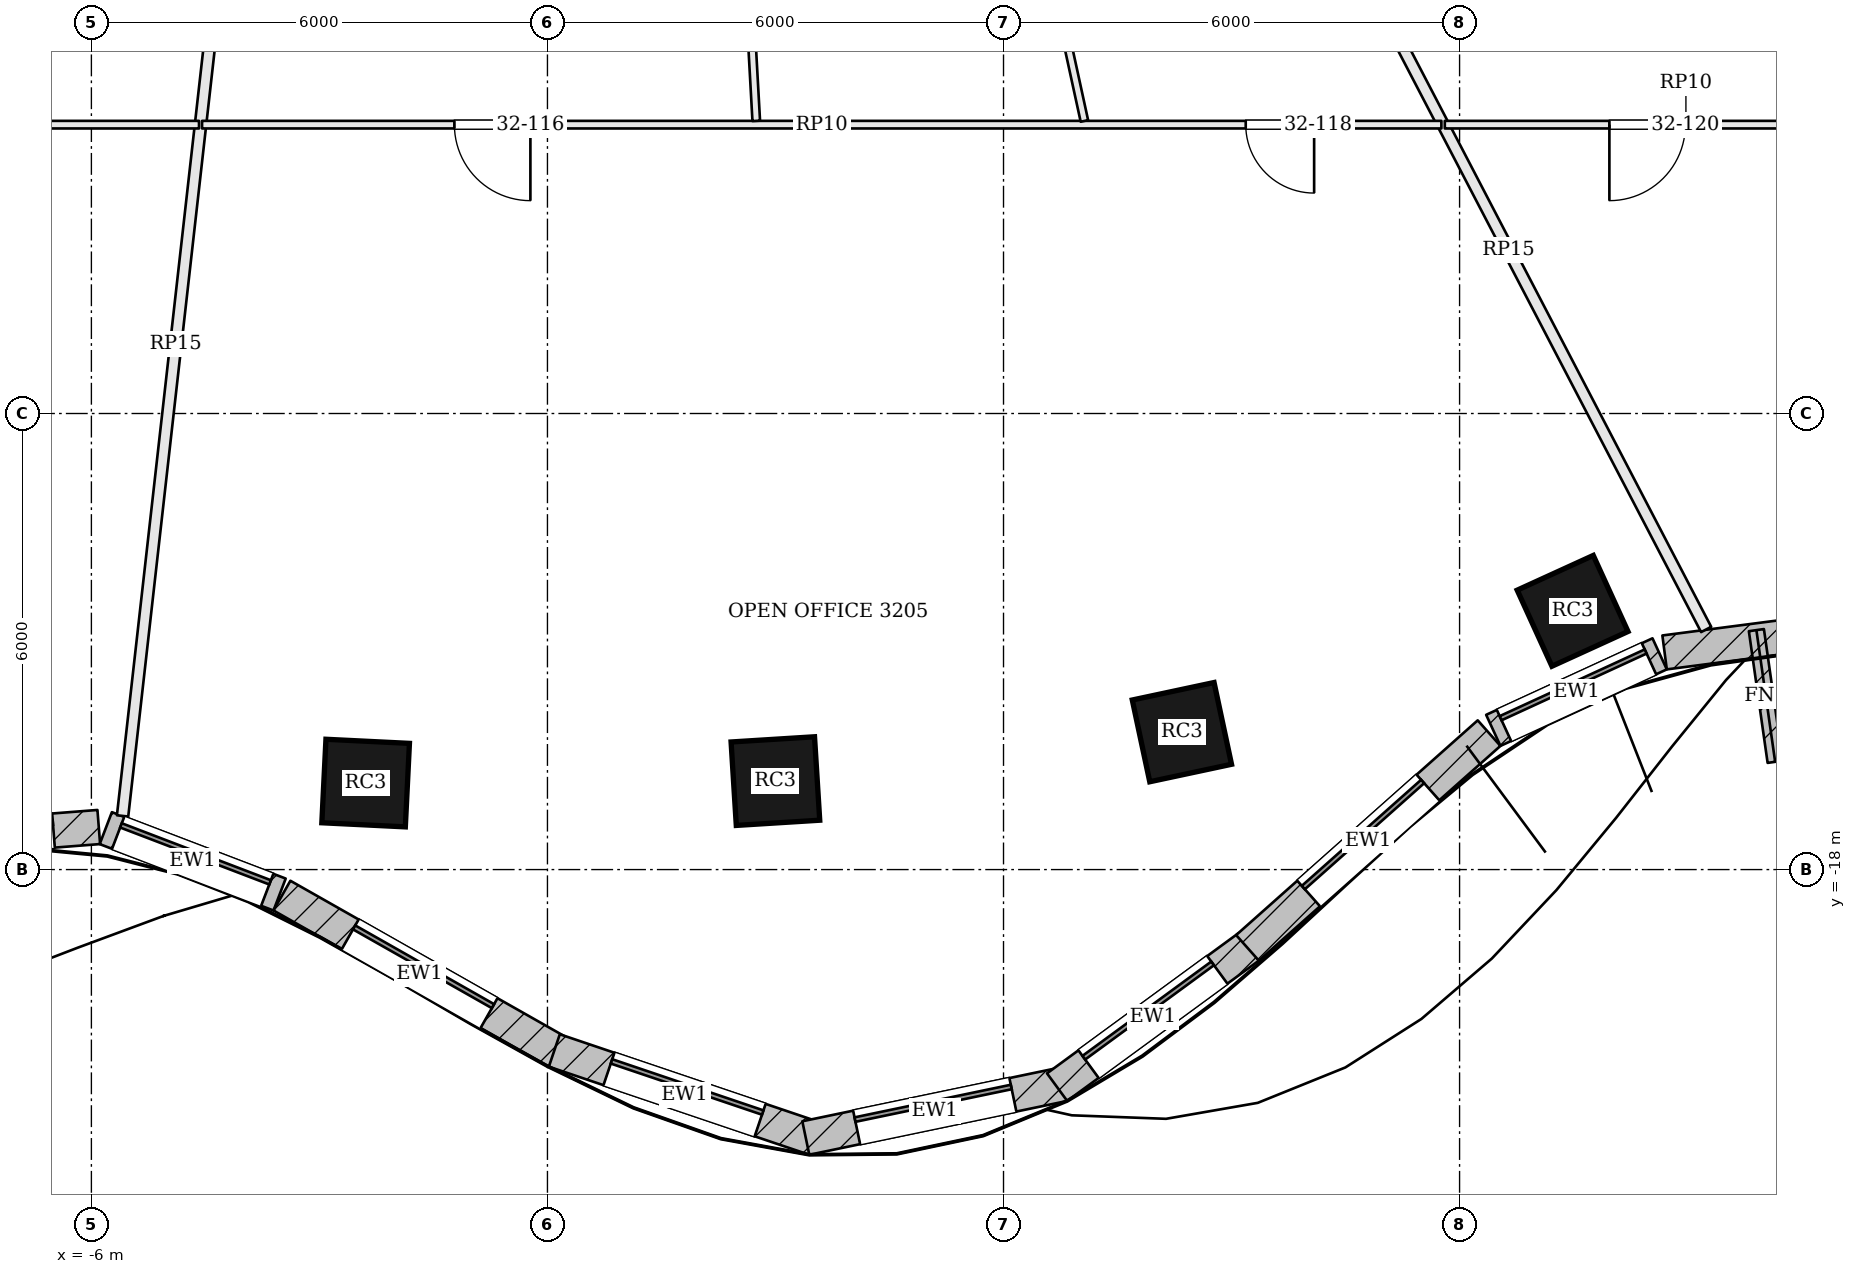
"""IFC4 building model, lengths in metres.
Left out: names, types, materials, properties, quantities, classifications, styles, units other than length and angle.
Written with IfcOpenShell. Run it as: python <this file> out.ifc"""

import sys

from ifc_helpers import new_model, si_unit, direction, frame, frame_2d, origin, origin_2d, place, context, subcontext, project, spatial, rectangle, extrude, element, fill, save


model = new_model("IFC4")
c1 = context("Model", 3, precision=1e-05, world=origin(), true_north=direction((0.0, 1.0)))
c2 = subcontext(c1, "Body", "Model", "MODEL_VIEW")
j1 = project(units=[si_unit("LENGTHUNIT", "METRE"), si_unit("PLANEANGLEUNIT", "RADIAN")], contexts=[c1])
p1 = place(None, origin())
s1 = spatial("IfcSite", under=j1, at=p1, CompositionType="ELEMENT")
p2 = place(p1, origin())
s2 = spatial("IfcBuilding", under=s1, at=p2, CompositionType="ELEMENT")
p3 = place(p2, frame((0.0, 0.0, 134.4)))
s3 = spatial("IfcBuildingStorey", under=s2, at=p3, CompositionType="ELEMENT", Elevation=134.4)
for number, where, z_axis, x_axis in (
    (1, (-2.392, -16.862, 0.0), (0.0, 0.0, 1.0), (0.999, -0.049, 0.0)),
    (2, (2.999, -16.836, 0.0), (0.0, 0.0, 1.0), (0.998, 0.062, 0.0)),
    (3, (8.347, -16.192, 0.0), (0.0, 0.0, 1.0), (0.978, 0.209, 0.0)),
    (4, (13.487, -14.596, 0.0), (0.0, 0.0, 1.0), (0.91, 0.415, 0.0)),
):
    element("IfcColumn", number, at=place(p3, frame(where, z_axis=z_axis, x_axis=x_axis)), inside=s3, PredefinedType="COLUMN", context=c2, shape_type="SweptSolid", body=[
        extrude(rectangle(XDim=1.1, YDim=1.1, at=origin_2d()), origin(), (0.0, 0.0, 1.0), 3.9),
    ])
p4 = place(p3, frame((-9.188, -17.697, 0.0), z_axis=(0.0, 0.0, 1.0), x_axis=(0.996964028691, 0.077863505548, 0.0)))
e5 = element("IfcWall", 5, at=p4, inside=s3, PredefinedType="SOLIDWALL", context=c2, shape_type="SweptSolid", body=[
    extrude(rectangle(XDim=3.295, YDim=0.45, at=frame_2d((1.648, 0.0))), origin(), (0.0, 0.0, 1.0), 3.7),
])
p5 = place(p4, frame((0.598, 0.0, 0.9)))
e6 = element("IfcOpeningElement", 6, at=p5, cuts=e5, PredefinedType="OPENING", context=c2, shape_type="SweptSolid", body=[
    extrude(rectangle(XDim=2.1, YDim=2.3, at=frame_2d((1.05, 1.15))), frame((0.0, 0.235, 0.0), z_axis=(0.0, -1.0, 0.0), x_axis=(1.0, 0.0, 0.0)), (0.0, 0.0, 1.0), 0.47),
])
p6 = place(p3, frame((-5.811, -17.455, 0.0), z_axis=(0.0, 0.0, 1.0), x_axis=(0.934122271306, -0.35695319336, 0.0)))
e7 = element("IfcWall", 7, at=p6, inside=s3, PredefinedType="SOLIDWALL", context=c2, shape_type="SweptSolid", body=[
    extrude(rectangle(XDim=2.448, YDim=0.45, at=frame_2d((1.224, 0.0))), origin(), (0.0, 0.0, 1.0), 3.7),
])
p7 = place(p6, frame((0.174, 0.0, 0.9)))
e8 = element("IfcOpeningElement", 8, at=p7, cuts=e7, PredefinedType="OPENING", context=c2, shape_type="SweptSolid", body=[
    extrude(rectangle(XDim=2.1, YDim=2.3, at=frame_2d((1.05, 1.15))), frame((0.0, 0.235, 0.0), z_axis=(0.0, -1.0, 0.0), x_axis=(1.0, 0.0, 0.0)), (0.0, 0.0, 1.0), 0.47),
])
p8 = place(p3, frame((-3.493, -18.343, 0.0), z_axis=(0.0, 0.0, 1.0), x_axis=(0.869825988853, -0.493358641473, 0.0)))
e9 = element("IfcWall", 9, at=p8, inside=s3, PredefinedType="SOLIDWALL", context=c2, shape_type="SweptSolid", body=[
    extrude(rectangle(XDim=4.165, YDim=0.45, at=frame_2d((2.083, 0.0))), origin(), (0.0, 0.0, 1.0), 3.7),
])
p9 = place(p8, frame((1.032, 0.0, 0.9)))
e10 = element("IfcOpeningElement", 10, at=p9, cuts=e9, PredefinedType="OPENING", context=c2, shape_type="SweptSolid", body=[
    extrude(rectangle(XDim=2.1, YDim=2.3, at=frame_2d((1.05, 1.15))), frame((0.0, 0.235, 0.0), z_axis=(0.0, -1.0, 0.0), x_axis=(1.0, 0.0, 0.0)), (0.0, 0.0, 1.0), 0.47),
])
p10 = place(p3, frame((0.091, -20.38, 0.0), z_axis=(0.0, 0.0, 1.0), x_axis=(0.947304227221, -0.320335294791, 0.0)))
e11 = element("IfcWall", 11, at=p10, inside=s3, PredefinedType="SOLIDWALL", context=c2, shape_type="SweptSolid", body=[
    extrude(rectangle(XDim=3.617, YDim=0.45, at=frame_2d((1.809, 0.0))), origin(), (0.0, 0.0, 1.0), 3.7),
])
p11 = place(p10, frame((0.759, 0.0, 0.9)))
e12 = element("IfcOpeningElement", 12, at=p11, cuts=e11, PredefinedType="OPENING", context=c2, shape_type="SweptSolid", body=[
    extrude(rectangle(XDim=2.1, YDim=2.3, at=frame_2d((1.05, 1.15))), frame((0.0, 0.235, 0.0), z_axis=(0.0, -1.0, 0.0), x_axis=(1.0, 0.0, 0.0)), (0.0, 0.0, 1.0), 0.47),
])
p12 = place(p3, frame((3.399, -21.532, 0.0), z_axis=(0.0, 0.0, 1.0), x_axis=(0.978915912181, 0.204263645512, 0.0)))
e13 = element("IfcWall", 13, at=p12, inside=s3, PredefinedType="SOLIDWALL", context=c2, shape_type="SweptSolid", body=[
    extrude(rectangle(XDim=3.466, YDim=0.45, at=frame_2d((1.733, 0.0))), origin(), (0.0, 0.0, 1.0), 3.7),
])
p13 = place(p12, frame((0.683, 0.0, 0.9)))
e14 = element("IfcOpeningElement", 14, at=p13, cuts=e13, PredefinedType="OPENING", context=c2, shape_type="SweptSolid", body=[
    extrude(rectangle(XDim=2.1, YDim=2.3, at=frame_2d((1.05, 1.15))), frame((0.0, 0.235, 0.0), z_axis=(0.0, -1.0, 0.0), x_axis=(1.0, 0.0, 0.0)), (0.0, 0.0, 1.0), 0.47),
])
p14 = place(p3, frame((6.705, -20.862, 0.0), z_axis=(0.0, 0.0, 1.0), x_axis=(0.806921336267, 0.590658917716, 0.0)))
e15 = element("IfcWall", 15, at=p14, inside=s3, PredefinedType="SOLIDWALL", context=c2, shape_type="SweptSolid", body=[
    extrude(rectangle(XDim=3.125, YDim=0.45, at=frame_2d((1.562, 0.0))), origin(), (0.0, 0.0, 1.0), 3.7),
])
p15 = place(p14, frame((0.512, 0.0, 0.9)))
e16 = element("IfcOpeningElement", 16, at=p15, cuts=e15, PredefinedType="OPENING", context=c2, shape_type="SweptSolid", body=[
    extrude(rectangle(XDim=2.1, YDim=2.3, at=frame_2d((1.05, 1.15))), frame((0.0, 0.235, 0.0), z_axis=(0.0, -1.0, 0.0), x_axis=(1.0, 0.0, 0.0)), (0.0, 0.0, 1.0), 0.47),
])
p16 = place(p3, frame((9.21, -19.03, 0.0), z_axis=(0.0, 0.0, 1.0), x_axis=(0.747396648191, 0.664378092861, 0.0)))
e17 = element("IfcWall", 17, at=p16, inside=s3, PredefinedType="SOLIDWALL", context=c2, shape_type="SweptSolid", body=[
    extrude(rectangle(XDim=4.252, YDim=0.45, at=frame_2d((2.126, 0.0))), origin(), (0.0, 0.0, 1.0), 3.7),
])
p17 = place(p16, frame((1.076, 0.0, 0.9)))
e18 = element("IfcOpeningElement", 18, at=p17, cuts=e17, PredefinedType="OPENING", context=c2, shape_type="SweptSolid", body=[
    extrude(rectangle(XDim=2.1, YDim=2.3, at=frame_2d((1.05, 1.15))), frame((0.0, 0.235, 0.0), z_axis=(0.0, -1.0, 0.0), x_axis=(1.0, 0.0, 0.0)), (0.0, 0.0, 1.0), 0.47),
])
p18 = place(p3, frame((12.444, -16.169, 0.0), z_axis=(0.0, 0.0, 1.0), x_axis=(0.908468904074, 0.417952449844, 0.0)))
e19 = element("IfcWall", 19, at=p18, inside=s3, PredefinedType="SOLIDWALL", context=c2, shape_type="SweptSolid", body=[
    extrude(rectangle(XDim=2.409, YDim=0.45, at=frame_2d((1.205, 0.0))), origin(), (0.0, 0.0, 1.0), 3.7),
])
p19 = place(p18, frame((0.155, 0.0, 0.9)))
e20 = element("IfcOpeningElement", 20, at=p19, cuts=e19, PredefinedType="OPENING", context=c2, shape_type="SweptSolid", body=[
    extrude(rectangle(XDim=2.1, YDim=2.3, at=frame_2d((1.05, 1.15))), frame((0.0, 0.235, 0.0), z_axis=(0.0, -1.0, 0.0), x_axis=(1.0, 0.0, 0.0)), (0.0, 0.0, 1.0), 0.47),
])
p20 = place(p3, frame((14.697, -15.143, 0.0), z_axis=(0.0, 0.0, 1.0), x_axis=(0.991631798411, 0.129098320597, 0.0)))
e21 = element("IfcWall", 21, at=p20, inside=s3, PredefinedType="SOLIDWALL", context=c2, shape_type="SweptSolid", body=[
    extrude(rectangle(XDim=5.547, YDim=0.45, at=frame_2d((2.773, 0.0))), origin(), (0.0, 0.0, 1.0), 3.7),
])
p21 = place(p20, frame((1.723, 0.0, 0.9)))
e22 = element("IfcOpeningElement", 22, at=p21, cuts=e21, PredefinedType="OPENING", context=c2, shape_type="SweptSolid", body=[
    extrude(rectangle(XDim=2.1, YDim=2.3, at=frame_2d((1.05, 1.15))), frame((0.0, 0.235, 0.0), z_axis=(0.0, -1.0, 0.0), x_axis=(1.0, 0.0, 0.0)), (0.0, 0.0, 1.0), 0.47),
])
p22 = place(p3, frame((15.905, -14.85, 0.0), z_axis=(0.0, 0.0, 1.0), x_axis=(0.140913490987, -0.990021912918, 0.0)))
e23 = element("IfcWall", 23, at=p22, inside=s3, PredefinedType="SOLIDWALL", context=c2, shape_type="SweptSolid", body=[
    extrude(rectangle(XDim=1.75, YDim=0.2, at=frame_2d((0.875, 0.0))), origin(), (0.0, 0.0, 1.0), 3.7),
])
p23 = place(p3, frame((-5.59, -17.294, 0.0), z_axis=(0.0, 0.0, 1.0), x_axis=(0.112047950982, 0.993702800983, 0.0)))
e24 = element("IfcWall", 24, at=p23, inside=s3, PredefinedType="PARTITIONING", context=c2, shape_type="SweptSolid", body=[
    extrude(rectangle(XDim=12.498, YDim=0.15, at=frame_2d((6.249, 0.0))), origin(), (0.0, 0.0, 1.0), 3.198),
])
p24 = place(p3, frame((15.244, -14.841, 0.0), z_axis=(0.0, 0.0, 1.0), x_axis=(-0.46213645011, 0.88680883029, 0.0)))
e25 = element("IfcWall", 25, at=p24, inside=s3, PredefinedType="PARTITIONING", context=c2, shape_type="SweptSolid", body=[
    extrude(rectangle(XDim=11.248, YDim=0.15, at=frame_2d((5.624, 0.0))), origin(), (0.0, 0.0, 1.0), 3.198),
])
p25 = place(p3, frame((-4.584, -8.2, 0.0), z_axis=(0.0, 0.0, 1.0), x_axis=(-1.0, 0.0, 0.0)))
e26 = element("IfcWall", 26, at=p25, inside=s3, PredefinedType="PARTITIONING", context=c2, shape_type="SweptSolid", body=[
    extrude(rectangle(XDim=13.566, YDim=0.1, at=frame_2d((6.783, 0.0))), origin(), (0.0, 0.0, 1.0), 3.184),
])
p26 = place(p3, frame((-6.453, -4.873, 0.0), z_axis=(0.0, 0.0, 1.0), x_axis=(-0.21917670953, -0.975685179758, 0.0)))
e27 = element("IfcWall", 27, at=p26, inside=s3, PredefinedType="PARTITIONING", context=c2, shape_type="SweptSolid", body=[
    extrude(rectangle(XDim=3.36, YDim=0.1, at=frame_2d((1.68, 0.0))), origin(), (0.0, 0.0, 1.0), 3.184),
])
p27 = place(p3, frame((11.76, -8.2, 0.0), z_axis=(0.0, 0.0, 1.0), x_axis=(-1.0, 0.0, 0.0)))
e28 = element("IfcWall", 28, at=p27, inside=s3, PredefinedType="PARTITIONING", context=c2, shape_type="SweptSolid", body=[
    extrude(rectangle(XDim=16.305, YDim=0.1, at=frame_2d((8.152, 0.0))), origin(), (0.0, 0.0, 1.0), 3.184),
])
p28 = place(p27, frame((11.985, 0.0, 0.0)))
e29 = element("IfcOpeningElement", 29, at=p28, cuts=e28, PredefinedType="OPENING", context=c2, shape_type="SweptSolid", body=[
    extrude(rectangle(XDim=1.0, YDim=2.1, at=frame_2d((0.5, 1.05))), frame((0.0, 0.06, 0.0), z_axis=(0.0, -1.0, 0.0), x_axis=(1.0, 0.0, 0.0)), (0.0, 0.0, 1.0), 0.12),
])
p29 = place(p27, frame((1.674, 0.0, 0.0)))
e30 = element("IfcOpeningElement", 30, at=p29, cuts=e28, PredefinedType="OPENING", context=c2, shape_type="SweptSolid", body=[
    extrude(rectangle(XDim=0.9, YDim=2.1, at=frame_2d((0.45, 1.05))), frame((0.0, 0.06, 0.0), z_axis=(0.0, -1.0, 0.0), x_axis=(1.0, 0.0, 0.0)), (0.0, 0.0, 1.0), 0.12),
])
p30 = place(p3, frame((2.566, -4.875, 0.0), z_axis=(0.0, 0.0, 1.0), x_axis=(0.05515260166, -0.998477936927, 0.0)))
e31 = element("IfcWall", 31, at=p30, inside=s3, PredefinedType="PARTITIONING", context=c2, shape_type="SweptSolid", body=[
    extrude(rectangle(XDim=3.28, YDim=0.1, at=frame_2d((1.64, 0.0))), origin(), (0.0, 0.0, 1.0), 3.184),
])
p31 = place(p3, frame((6.35, -4.873, 0.0), z_axis=(0.0, 0.0, 1.0), x_axis=(0.213006668545, -0.977050745435, 0.0)))
e32 = element("IfcWall", 32, at=p31, inside=s3, PredefinedType="PARTITIONING", context=c2, shape_type="SweptSolid", body=[
    extrude(rectangle(XDim=3.355, YDim=0.1, at=frame_2d((1.677, 0.0))), origin(), (0.0, 0.0, 1.0), 3.184),
])
p32 = place(p3, frame((18.15, -8.2, 0.0), z_axis=(0.0, 0.0, 1.0), x_axis=(-1.0, 0.0, 0.0)))
e33 = element("IfcWall", 33, at=p32, inside=s3, PredefinedType="PARTITIONING", context=c2, shape_type="SweptSolid", body=[
    extrude(rectangle(XDim=6.344, YDim=0.1, at=frame_2d((3.172, 0.0))), origin(), (0.0, 0.0, 1.0), 3.184),
])
p33 = place(p32, frame((3.179, 0.0, 0.0)))
e34 = element("IfcOpeningElement", 34, at=p33, cuts=e33, PredefinedType="OPENING", context=c2, shape_type="SweptSolid", body=[
    extrude(rectangle(XDim=1.0, YDim=2.1, at=frame_2d((0.5, 1.05))), frame((0.0, 0.06, 0.0), z_axis=(0.0, -1.0, 0.0), x_axis=(1.0, 0.0, 0.0)), (0.0, 0.0, 1.0), 0.12),
])
p34 = place(p3, frame((13.896, -4.844, 0.0), z_axis=(0.0, 0.0, 1.0), x_axis=(0.810468668719, -0.585781987624, 0.0)))
e35 = element("IfcWall", 35, at=p34, inside=s3, PredefinedType="PARTITIONING", context=c2, shape_type="SweptSolid", body=[
    extrude(rectangle(XDim=5.26, YDim=0.1, at=frame_2d((2.63, 0.0))), origin(), (0.0, 0.0, 1.0), 3.184),
])
p35 = place(p5, origin())
e36 = element("IfcWindow", 36, at=p35, inside=s3, PartitioningType="SINGLE_PANEL", PredefinedType="WINDOW", context=c2, shape_type="SweptSolid", body=[
    extrude(rectangle(XDim=2.1, YDim=2.3, at=frame_2d((1.05, 1.15))), frame((0.0, 0.135, 0.0), z_axis=(0.0, -1.0, 0.0), x_axis=(1.0, 0.0, 0.0)), (0.0, 0.0, 1.0), 0.06),
])
fill(e6, e36)
p36 = place(p7, origin())
e37 = element("IfcWindow", 37, at=p36, inside=s3, PartitioningType="SINGLE_PANEL", PredefinedType="WINDOW", context=c2, shape_type="SweptSolid", body=[
    extrude(rectangle(XDim=2.1, YDim=2.3, at=frame_2d((1.05, 1.15))), frame((0.0, 0.135, 0.0), z_axis=(0.0, -1.0, 0.0), x_axis=(1.0, 0.0, 0.0)), (0.0, 0.0, 1.0), 0.06),
])
fill(e8, e37)
p37 = place(p9, origin())
e38 = element("IfcWindow", 38, at=p37, inside=s3, PartitioningType="SINGLE_PANEL", PredefinedType="WINDOW", context=c2, shape_type="SweptSolid", body=[
    extrude(rectangle(XDim=2.1, YDim=2.3, at=frame_2d((1.05, 1.15))), frame((0.0, 0.135, 0.0), z_axis=(0.0, -1.0, 0.0), x_axis=(1.0, 0.0, 0.0)), (0.0, 0.0, 1.0), 0.06),
])
fill(e10, e38)
p38 = place(p11, origin())
e39 = element("IfcWindow", 39, at=p38, inside=s3, PartitioningType="SINGLE_PANEL", PredefinedType="WINDOW", context=c2, shape_type="SweptSolid", body=[
    extrude(rectangle(XDim=2.1, YDim=2.3, at=frame_2d((1.05, 1.15))), frame((0.0, 0.135, 0.0), z_axis=(0.0, -1.0, 0.0), x_axis=(1.0, 0.0, 0.0)), (0.0, 0.0, 1.0), 0.06),
])
fill(e12, e39)
p39 = place(p13, origin())
e40 = element("IfcWindow", 40, at=p39, inside=s3, PartitioningType="SINGLE_PANEL", PredefinedType="WINDOW", context=c2, shape_type="SweptSolid", body=[
    extrude(rectangle(XDim=2.1, YDim=2.3, at=frame_2d((1.05, 1.15))), frame((0.0, 0.135, 0.0), z_axis=(0.0, -1.0, 0.0), x_axis=(1.0, 0.0, 0.0)), (0.0, 0.0, 1.0), 0.06),
])
fill(e14, e40)
p40 = place(p15, origin())
e41 = element("IfcWindow", 41, at=p40, inside=s3, PartitioningType="SINGLE_PANEL", PredefinedType="WINDOW", context=c2, shape_type="SweptSolid", body=[
    extrude(rectangle(XDim=2.1, YDim=2.3, at=frame_2d((1.05, 1.15))), frame((0.0, 0.135, 0.0), z_axis=(0.0, -1.0, 0.0), x_axis=(1.0, 0.0, 0.0)), (0.0, 0.0, 1.0), 0.06),
])
fill(e16, e41)
p41 = place(p17, origin())
e42 = element("IfcWindow", 42, at=p41, inside=s3, PartitioningType="SINGLE_PANEL", PredefinedType="WINDOW", context=c2, shape_type="SweptSolid", body=[
    extrude(rectangle(XDim=2.1, YDim=2.3, at=frame_2d((1.05, 1.15))), frame((0.0, 0.135, 0.0), z_axis=(0.0, -1.0, 0.0), x_axis=(1.0, 0.0, 0.0)), (0.0, 0.0, 1.0), 0.06),
])
fill(e18, e42)
p42 = place(p19, origin())
e43 = element("IfcWindow", 43, at=p42, inside=s3, PartitioningType="SINGLE_PANEL", PredefinedType="WINDOW", context=c2, shape_type="SweptSolid", body=[
    extrude(rectangle(XDim=2.1, YDim=2.3, at=frame_2d((1.05, 1.15))), frame((0.0, 0.135, 0.0), z_axis=(0.0, -1.0, 0.0), x_axis=(1.0, 0.0, 0.0)), (0.0, 0.0, 1.0), 0.06),
])
fill(e20, e43)
p43 = place(p28, origin())
e44 = element("IfcDoor", 44, at=p43, inside=s3, OperationType="SINGLE_SWING_LEFT", PredefinedType="DOOR", context=c2, shape_type="SweptSolid", body=[
    extrude(rectangle(XDim=1.0, YDim=2.1, at=frame_2d((0.5, 1.05))), frame((0.0, 0.025, 0.0), z_axis=(0.0, -1.0, 0.0), x_axis=(1.0, 0.0, 0.0)), (0.0, 0.0, 1.0), 0.05),
])
fill(e29, e44)
p44 = place(p29, origin())
e45 = element("IfcDoor", 45, at=p44, inside=s3, OperationType="SINGLE_SWING_LEFT", PredefinedType="DOOR", context=c2, shape_type="SweptSolid", body=[
    extrude(rectangle(XDim=0.9, YDim=2.1, at=frame_2d((0.45, 1.05))), frame((0.0, 0.025, 0.0), z_axis=(0.0, -1.0, 0.0), x_axis=(1.0, 0.0, 0.0)), (0.0, 0.0, 1.0), 0.05),
])
fill(e30, e45)
p45 = place(p33, origin())
e46 = element("IfcDoor", 46, at=p45, inside=s3, OperationType="SINGLE_SWING_RIGHT", PredefinedType="DOOR", context=c2, shape_type="SweptSolid", body=[
    extrude(rectangle(XDim=1.0, YDim=2.1, at=frame_2d((0.5, 1.05))), frame((0.0, 0.025, 0.0), z_axis=(0.0, -1.0, 0.0), x_axis=(1.0, 0.0, 0.0)), (0.0, 0.0, 1.0), 0.05),
])
fill(e34, e46)
save(model, sys.argv[1])
